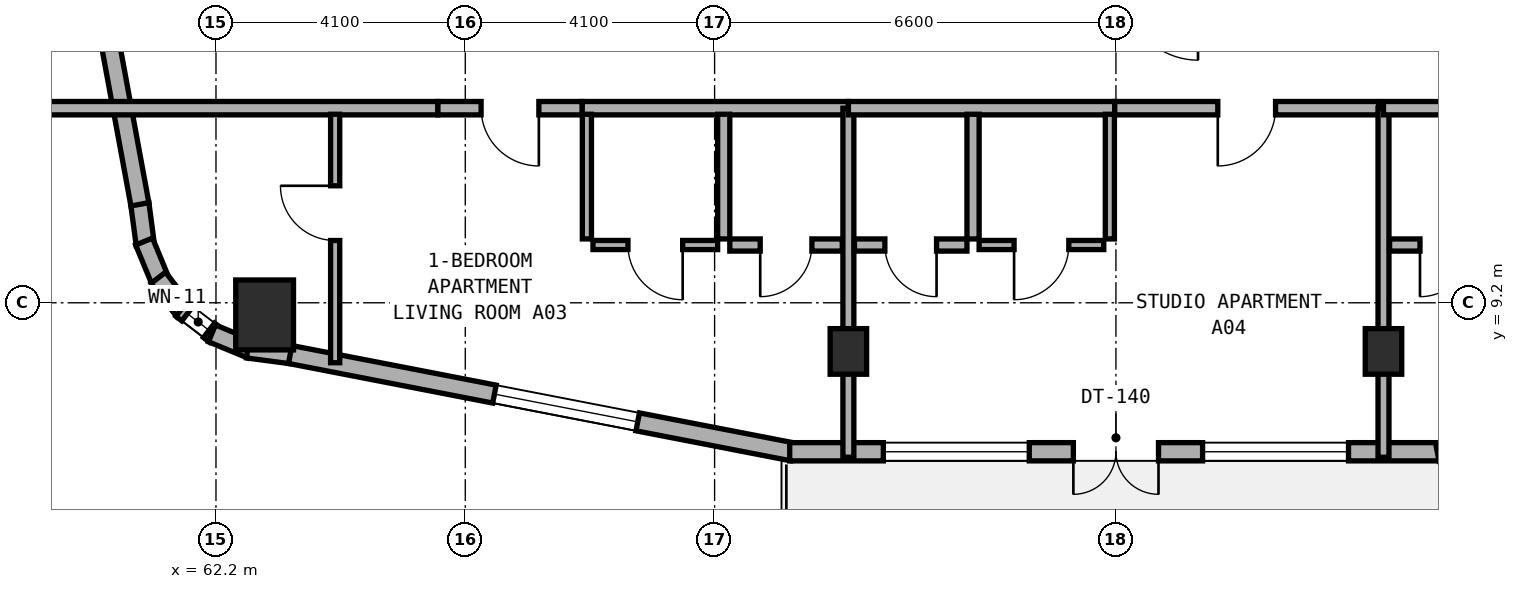
"""IFC4 building model, lengths in metres.
Left out: names, types, materials, properties, quantities, classifications, styles, units other than length and angle.
Written with IfcOpenShell. Run it as: python <this file> out.ifc"""

import sys

from ifc_helpers import new_model, si_unit, direction, frame, frame_2d, origin, origin_2d, place, context, subcontext, project, spatial, rectangle, extrude, element, fill, save


model = new_model("IFC4")
c1 = context("Model", 3, precision=1e-05, world=origin(), true_north=direction((0.0, 1.0)))
c2 = subcontext(c1, "Body", "Model", "MODEL_VIEW")
j1 = project(units=[si_unit("LENGTHUNIT", "METRE"), si_unit("PLANEANGLEUNIT", "RADIAN")], contexts=[c1])
p1 = place(None, origin())
s1 = spatial("IfcSite", under=j1, at=p1, CompositionType="ELEMENT")
p2 = place(p1, origin())
s2 = spatial("IfcBuilding", under=s1, at=p2, CompositionType="ELEMENT")
p3 = place(p2, frame((0.0, 0.0, 80.0)))
s3 = spatial("IfcBuildingStorey", under=s2, at=p3, CompositionType="ELEMENT", Elevation=80.0)
for number, where, z_axis, x_axis in (
    (1, (72.6, 8.4, 0.0), (0.0, 0.0, 1.0), (1.0, 0.0, 0.0)),
    (2, (81.4, 8.4, 0.0), (0.0, 0.0, 1.0), (1.0, 0.0, 0.0)),
):
    element("IfcColumn", number, at=place(p3, frame(where, z_axis=z_axis, x_axis=x_axis)), inside=s3, PredefinedType="COLUMN", context=c2, shape_type="SweptSolid", body=[
        extrude(rectangle(XDim=0.6, YDim=0.75, at=origin_2d()), origin(), (0.0, 0.0, 1.0), 3.5),
    ])
p4 = place(p3, frame((63.0, 9.0, 0.0), z_axis=(0.0, 0.0, 1.0), x_axis=(1.0, 0.0, 0.0)))
e3 = element("IfcColumn", 3, at=p4, inside=s3, PredefinedType="COLUMN", context=c2, shape_type="SweptSolid", body=[
    extrude(rectangle(XDim=0.95, YDim=1.15, at=origin_2d()), origin(), (0.0, 0.0, 1.0), 3.5),
])
p5 = place(p3, frame((60.948, 10.828, 0.0), z_axis=(0.0, 0.0, 1.0), x_axis=(0.131667498923, -0.991293937098, 0.0)))
e4 = element("IfcWall", 4, at=p5, inside=s3, PredefinedType="STANDARD", context=c2, shape_type="SweptSolid", body=[
    extrude(rectangle(XDim=0.677, YDim=0.3, at=frame_2d((0.338, 0.0))), origin(), (0.0, 0.0, 1.0), 3.25),
])
p6 = place(p3, frame((61.018, 10.207, 0.0), z_axis=(0.0, 0.0, 1.0), x_axis=(0.381864727877, -0.92421822618, 0.0)))
e5 = element("IfcWall", 5, at=p6, inside=s3, PredefinedType="STANDARD", context=c2, shape_type="SweptSolid", body=[
    extrude(rectangle(XDim=0.694, YDim=0.3, at=frame_2d((0.347, 0.0))), origin(), (0.0, 0.0, 1.0), 3.25),
])
p7 = place(p3, frame((61.252, 9.611, 0.0), z_axis=(0.0, 0.0, 1.0), x_axis=(0.609693758543, -0.792637067512, 0.0)))
e6 = element("IfcWall", 6, at=p7, inside=s3, PredefinedType="STANDARD", context=c2, shape_type="SweptSolid", body=[
    extrude(rectangle(XDim=0.694, YDim=0.3, at=frame_2d((0.347, 0.0))), origin(), (0.0, 0.0, 1.0), 3.25),
])
p8 = place(p3, frame((61.633, 9.096, 0.0), z_axis=(0.0, 0.0, 1.0), x_axis=(0.792807092876, -0.609472651958, 0.0)))
e7 = element("IfcWall", 7, at=p8, inside=s3, PredefinedType="STANDARD", context=c2, shape_type="SweptSolid", body=[
    extrude(rectangle(XDim=0.694, YDim=0.3, at=frame_2d((0.347, 0.0))), origin(), (0.0, 0.0, 1.0), 3.25),
])
p9 = place(p8, frame((0.122, 0.0, 0.85)))
e8 = element("IfcOpeningElement", 8, at=p9, cuts=e7, PredefinedType="OPENING", context=c2, shape_type="SweptSolid", body=[
    extrude(rectangle(XDim=0.45, YDim=1.5, at=frame_2d((0.225, 0.75))), frame((0.0, 0.16, 0.0), z_axis=(0.0, -1.0, 0.0), x_axis=(1.0, 0.0, 0.0)), (0.0, 0.0, 1.0), 0.32),
])
p10 = place(p3, frame((62.134, 8.697, 0.0), z_axis=(0.0, 0.0, 1.0), x_axis=(0.924042561464, -0.382289608286, 0.0)))
e9 = element("IfcWall", 9, at=p10, inside=s3, PredefinedType="STANDARD", context=c2, shape_type="SweptSolid", body=[
    extrude(rectangle(XDim=0.694, YDim=0.3, at=frame_2d((0.347, 0.0))), origin(), (0.0, 0.0, 1.0), 3.25),
])
p11 = place(p3, frame((62.722, 8.441, 0.0), z_axis=(0.0, 0.0, 1.0), x_axis=(0.991433279471, -0.130614135366, 0.0)))
e10 = element("IfcWall", 10, at=p11, inside=s3, PredefinedType="STANDARD", context=c2, shape_type="SweptSolid", body=[
    extrude(rectangle(XDim=0.712, YDim=0.3, at=frame_2d((0.356, 0.0))), origin(), (0.0, 0.0, 1.0), 3.25),
])
p12 = place(p3, frame((63.421, 8.349, 0.0), z_axis=(0.0, 0.0, 1.0), x_axis=(0.98174070399, -0.190224052445, 0.0)))
e11 = element("IfcWall", 11, at=p12, inside=s3, PredefinedType="STANDARD", context=c2, shape_type="SweptSolid", body=[
    extrude(rectangle(XDim=8.412, YDim=0.3, at=frame_2d((4.206, 0.0))), origin(), (0.0, 0.0, 1.0), 3.25),
])
p13 = place(p12, frame((3.421, 0.0, 0.8)))
e12 = element("IfcOpeningElement", 12, at=p13, cuts=e11, PredefinedType="OPENING", context=c2, shape_type="SweptSolid", body=[
    extrude(rectangle(XDim=2.4, YDim=1.6, at=frame_2d((1.2, 0.8))), frame((0.0, 0.16, 0.0), z_axis=(0.0, -1.0, 0.0), x_axis=(1.0, 0.0, 0.0)), (0.0, 0.0, 1.0), 0.32),
])
p14 = place(p3, frame((71.635, 6.75, 0.0), z_axis=(0.0, 0.0, 1.0), x_axis=(1.0, 0.0, 0.0)))
e13 = element("IfcWall", 13, at=p14, inside=s3, PredefinedType="STANDARD", context=c2, shape_type="SweptSolid", body=[
    extrude(rectangle(XDim=10.695, YDim=0.3, at=frame_2d((5.348, 0.0))), origin(), (0.0, 0.0, 1.0), 3.25),
])
p15 = place(p14, frame((4.665, 0.0, 0.0)))
e14 = element("IfcOpeningElement", 14, at=p15, cuts=e13, PredefinedType="OPENING", context=c2, shape_type="SweptSolid", body=[
    extrude(rectangle(XDim=1.4, YDim=2.15, at=frame_2d((0.7, 1.075))), frame((0.0, 0.16, 0.0), z_axis=(0.0, -1.0, 0.0), x_axis=(1.0, 0.0, 0.0)), (0.0, 0.0, 1.0), 0.32),
])
p16 = place(p14, frame((1.54, 0.0, 0.8)))
e15 = element("IfcOpeningElement", 15, at=p16, cuts=e13, PredefinedType="OPENING", context=c2, shape_type="SweptSolid", body=[
    extrude(rectangle(XDim=2.4, YDim=1.6, at=frame_2d((1.2, 0.8))), frame((0.0, 0.16, 0.0), z_axis=(0.0, -1.0, 0.0), x_axis=(1.0, 0.0, 0.0)), (0.0, 0.0, 1.0), 0.32),
])
p17 = place(p14, frame((6.79, 0.0, 0.8)))
e16 = element("IfcOpeningElement", 16, at=p17, cuts=e13, PredefinedType="OPENING", context=c2, shape_type="SweptSolid", body=[
    extrude(rectangle(XDim=2.4, YDim=1.6, at=frame_2d((1.2, 0.8))), frame((0.0, 0.16, 0.0), z_axis=(0.0, -1.0, 0.0), x_axis=(1.0, 0.0, 0.0)), (0.0, 0.0, 1.0), 0.32),
])
p18 = place(p3, frame((82.286, 6.742, 0.0), z_axis=(0.0, 0.0, 1.0), x_axis=(0.981734775858, 0.190254644808, 0.0)))
e17 = element("IfcWall", 17, at=p18, inside=s3, PredefinedType="STANDARD", context=c2, shape_type="SweptSolid", body=[
    extrude(rectangle(XDim=8.448, YDim=0.3, at=frame_2d((4.224, 0.0))), origin(), (0.0, 0.0, 1.0), 3.25),
])
p19 = place(p18, frame((2.609, 0.0, 0.8)))
e18 = element("IfcOpeningElement", 18, at=p19, cuts=e17, PredefinedType="OPENING", context=c2, shape_type="SweptSolid", body=[
    extrude(rectangle(XDim=2.4, YDim=1.6, at=frame_2d((1.2, 0.8))), frame((0.0, 0.16, 0.0), z_axis=(0.0, -1.0, 0.0), x_axis=(1.0, 0.0, 0.0)), (0.0, 0.0, 1.0), 0.32),
])
p20 = place(p3, frame((59.338, 19.561, 0.0), z_axis=(0.0, 0.0, 1.0), x_axis=(0.181241420611, -0.983438634311, 0.0)))
e19 = element("IfcWall", 19, at=p20, inside=s3, PredefinedType="STANDARD", context=c2, shape_type="SweptSolid", body=[
    extrude(rectangle(XDim=8.889, YDim=0.3, at=frame_2d((4.445, 0.0))), origin(), (0.0, 0.0, 1.0), 3.25),
])
p21 = place(p20, frame((1.497, 0.0, 0.8)))
e20 = element("IfcOpeningElement", 20, at=p21, cuts=e19, PredefinedType="OPENING", context=c2, shape_type="SweptSolid", body=[
    extrude(rectangle(XDim=2.4, YDim=1.6, at=frame_2d((1.2, 0.8))), frame((0.0, 0.16, 0.0), z_axis=(0.0, -1.0, 0.0), x_axis=(1.0, 0.0, 0.0)), (0.0, 0.0, 1.0), 0.32),
])
p22 = place(p3, frame((59.36, 12.4, 0.0), z_axis=(0.0, 0.0, 1.0), x_axis=(1.0, 0.0, 0.0)))
e21 = element("IfcWall", 21, at=p22, inside=s3, PredefinedType="SOLIDWALL", context=c2, shape_type="SweptSolid", body=[
    extrude(rectangle(XDim=6.49, YDim=0.22, at=frame_2d((3.245, 0.0))), origin(), (0.0, 0.0, 1.0), 2.945),
])
p23 = place(p3, frame((68.22, 12.4, 0.0), z_axis=(0.0, 0.0, 1.0), x_axis=(1.0, 0.0, 0.0)))
e22 = element("IfcWall", 22, at=p23, inside=s3, PredefinedType="SOLIDWALL", context=c2, shape_type="SweptSolid", body=[
    extrude(rectangle(XDim=4.38, YDim=0.22, at=frame_2d((2.19, 0.0))), origin(), (0.0, 0.0, 1.0), 2.825),
])
p24 = place(p3, frame((65.85, 12.4, 0.0), z_axis=(0.0, 0.0, 1.0), x_axis=(1.0, 0.0, 0.0)))
e23 = element("IfcWall", 23, at=p24, inside=s3, PredefinedType="SOLIDWALL", context=c2, shape_type="SweptSolid", body=[
    extrude(rectangle(XDim=2.37, YDim=0.22, at=frame_2d((1.185, 0.0))), origin(), (0.0, 0.0, 1.0), 3.22),
])
p25 = place(p24, frame((0.71, 0.0, 0.0)))
e24 = element("IfcOpeningElement", 24, at=p25, cuts=e23, PredefinedType="OPENING", context=c2, shape_type="SweptSolid", body=[
    extrude(rectangle(XDim=0.95, YDim=2.1, at=frame_2d((0.475, 1.05))), frame((0.0, 0.12, 0.0), z_axis=(0.0, -1.0, 0.0), x_axis=(1.0, 0.0, 0.0)), (0.0, 0.0, 1.0), 0.24),
])
p26 = place(p3, frame((64.16, 8.214, 0.0), z_axis=(0.0, 0.0, 1.0), x_axis=(0.0, 1.0, 0.0)))
e25 = element("IfcWall", 25, at=p26, inside=s3, PredefinedType="PARTITIONING", context=c2, shape_type="SweptSolid", body=[
    extrude(rectangle(XDim=4.086, YDim=0.15, at=frame_2d((2.043, 0.0))), origin(), (0.0, 0.0, 1.0), 2.945),
])
p27 = place(p26, frame((2.01, 0.0, 0.0)))
e26 = element("IfcOpeningElement", 26, at=p27, cuts=e25, PredefinedType="OPENING", context=c2, shape_type="SweptSolid", body=[
    extrude(rectangle(XDim=0.9, YDim=2.1, at=frame_2d((0.45, 1.05))), frame((0.0, 0.085, 0.0), z_axis=(0.0, -1.0, 0.0), x_axis=(1.0, 0.0, 0.0)), (0.0, 0.0, 1.0), 0.17),
])
p28 = place(p3, frame((70.55, 10.25, 0.0), z_axis=(0.0, 0.0, 1.0), x_axis=(0.0, 1.0, 0.0)))
e27 = element("IfcWall", 27, at=p28, inside=s3, PredefinedType="PLUMBINGWALL", context=c2, shape_type="SweptSolid", body=[
    extrude(rectangle(XDim=2.05, YDim=0.2, at=frame_2d((1.025, 0.0))), origin(), (0.0, 0.0, 1.0), 3.22),
])
p29 = place(p3, frame((68.3, 10.25, 0.0), z_axis=(0.0, 0.0, 1.0), x_axis=(0.0, 1.0, 0.0)))
e28 = element("IfcWall", 28, at=p29, inside=s3, PredefinedType="PARTITIONING", context=c2, shape_type="SweptSolid", body=[
    extrude(rectangle(XDim=2.05, YDim=0.15, at=frame_2d((1.025, 0.0))), origin(), (0.0, 0.0, 1.0), 3.22),
])
p30 = place(p3, frame((70.65, 10.15, 0.0), z_axis=(0.0, 0.0, 1.0), x_axis=(1.0, 0.0, 0.0)))
e29 = element("IfcWall", 29, at=p30, inside=s3, PredefinedType="PLUMBINGWALL", context=c2, shape_type="SweptSolid", body=[
    extrude(rectangle(XDim=1.85, YDim=0.2, at=frame_2d((0.925, 0.0))), origin(), (0.0, 0.0, 1.0), 3.22),
])
p31 = place(p30, frame((0.5, 0.0, 0.0)))
e30 = element("IfcOpeningElement", 30, at=p31, cuts=e29, PredefinedType="OPENING", context=c2, shape_type="SweptSolid", body=[
    extrude(rectangle(XDim=0.85, YDim=2.1, at=frame_2d((0.425, 1.05))), frame((0.0, 0.11, 0.0), z_axis=(0.0, -1.0, 0.0), x_axis=(1.0, 0.0, 0.0)), (0.0, 0.0, 1.0), 0.22),
])
p32 = place(p3, frame((68.4, 10.15, 0.0), z_axis=(0.0, 0.0, 1.0), x_axis=(1.0, 0.0, 0.0)))
e31 = element("IfcWall", 31, at=p32, inside=s3, PredefinedType="PARTITIONING", context=c2, shape_type="SweptSolid", body=[
    extrude(rectangle(XDim=2.05, YDim=0.15, at=frame_2d((1.025, 0.0))), origin(), (0.0, 0.0, 1.0), 3.22),
])
p33 = place(p32, frame((0.575, 0.0, 0.0)))
e32 = element("IfcOpeningElement", 32, at=p33, cuts=e31, PredefinedType="OPENING", context=c2, shape_type="SweptSolid", body=[
    extrude(rectangle(XDim=0.9, YDim=2.1, at=frame_2d((0.45, 1.05))), frame((0.0, 0.085, 0.0), z_axis=(0.0, -1.0, 0.0), x_axis=(1.0, 0.0, 0.0)), (0.0, 0.0, 1.0), 0.17),
])
p34 = place(p3, frame((72.6, 6.66, 0.0), z_axis=(0.0, 0.0, 1.0), x_axis=(0.0, 1.0, 0.0)))
e33 = element("IfcWall", 33, at=p34, inside=s3, PredefinedType="SOLIDWALL", context=c2, shape_type="SweptSolid", body=[
    extrude(rectangle(XDim=5.74, YDim=0.18, at=frame_2d((2.87, 0.0))), origin(), (0.0, 0.0, 1.0), 2.825),
])
p35 = place(p3, frame((72.6, 12.4, 0.0), z_axis=(0.0, 0.0, 1.0), x_axis=(1.0, 0.0, 0.0)))
e34 = element("IfcWall", 34, at=p35, inside=s3, PredefinedType="SOLIDWALL", context=c2, shape_type="SweptSolid", body=[
    extrude(rectangle(XDim=4.38, YDim=0.22, at=frame_2d((2.19, 0.0))), origin(), (0.0, 0.0, 1.0), 2.825),
])
p36 = place(p3, frame((76.98, 12.4, 0.0), z_axis=(0.0, 0.0, 1.0), x_axis=(1.0, 0.0, 0.0)))
e35 = element("IfcWall", 35, at=p36, inside=s3, PredefinedType="SOLIDWALL", context=c2, shape_type="SweptSolid", body=[
    extrude(rectangle(XDim=4.34, YDim=0.22, at=frame_2d((2.17, 0.0))), origin(), (0.0, 0.0, 1.0), 2.825),
])
p37 = place(p36, frame((1.695, 0.0, 0.0)))
e36 = element("IfcOpeningElement", 36, at=p37, cuts=e35, PredefinedType="OPENING", context=c2, shape_type="SweptSolid", body=[
    extrude(rectangle(XDim=0.95, YDim=2.1, at=frame_2d((0.475, 1.05))), frame((0.0, 0.12, 0.0), z_axis=(0.0, -1.0, 0.0), x_axis=(1.0, 0.0, 0.0)), (0.0, 0.0, 1.0), 0.24),
])
p38 = place(p3, frame((74.65, 10.25, 0.0), z_axis=(0.0, 0.0, 1.0), x_axis=(0.0, 1.0, 0.0)))
e37 = element("IfcWall", 37, at=p38, inside=s3, PredefinedType="PLUMBINGWALL", context=c2, shape_type="SweptSolid", body=[
    extrude(rectangle(XDim=2.05, YDim=0.2, at=frame_2d((1.025, 0.0))), origin(), (0.0, 0.0, 1.0), 2.825),
])
p39 = place(p3, frame((76.9, 10.25, 0.0), z_axis=(0.0, 0.0, 1.0), x_axis=(0.0, 1.0, 0.0)))
e38 = element("IfcWall", 38, at=p39, inside=s3, PredefinedType="PARTITIONING", context=c2, shape_type="SweptSolid", body=[
    extrude(rectangle(XDim=2.05, YDim=0.15, at=frame_2d((1.025, 0.0))), origin(), (0.0, 0.0, 1.0), 2.825),
])
p40 = place(p3, frame((72.7, 10.15, 0.0), z_axis=(0.0, 0.0, 1.0), x_axis=(1.0, 0.0, 0.0)))
e39 = element("IfcWall", 39, at=p40, inside=s3, PredefinedType="PLUMBINGWALL", context=c2, shape_type="SweptSolid", body=[
    extrude(rectangle(XDim=1.85, YDim=0.2, at=frame_2d((0.925, 0.0))), origin(), (0.0, 0.0, 1.0), 3.22),
])
p41 = place(p40, frame((0.5, 0.0, 0.0)))
e40 = element("IfcOpeningElement", 40, at=p41, cuts=e39, PredefinedType="OPENING", context=c2, shape_type="SweptSolid", body=[
    extrude(rectangle(XDim=0.85, YDim=2.1, at=frame_2d((0.425, 1.05))), frame((0.0, 0.11, 0.0), z_axis=(0.0, -1.0, 0.0), x_axis=(1.0, 0.0, 0.0)), (0.0, 0.0, 1.0), 0.22),
])
p42 = place(p3, frame((74.75, 10.15, 0.0), z_axis=(0.0, 0.0, 1.0), x_axis=(1.0, 0.0, 0.0)))
e41 = element("IfcWall", 41, at=p42, inside=s3, PredefinedType="PARTITIONING", context=c2, shape_type="SweptSolid", body=[
    extrude(rectangle(XDim=2.05, YDim=0.15, at=frame_2d((1.025, 0.0))), origin(), (0.0, 0.0, 1.0), 3.22),
])
p43 = place(p42, frame((0.575, 0.0, 0.0)))
e42 = element("IfcOpeningElement", 42, at=p43, cuts=e41, PredefinedType="OPENING", context=c2, shape_type="SweptSolid", body=[
    extrude(rectangle(XDim=0.9, YDim=2.1, at=frame_2d((0.45, 1.05))), frame((0.0, 0.085, 0.0), z_axis=(0.0, -1.0, 0.0), x_axis=(1.0, 0.0, 0.0)), (0.0, 0.0, 1.0), 0.17),
])
p44 = place(p3, frame((81.4, 6.66, 0.0), z_axis=(0.0, 0.0, 1.0), x_axis=(0.0, 1.0, 0.0)))
e43 = element("IfcWall", 43, at=p44, inside=s3, PredefinedType="SOLIDWALL", context=c2, shape_type="SweptSolid", body=[
    extrude(rectangle(XDim=5.74, YDim=0.18, at=frame_2d((2.87, 0.0))), origin(), (0.0, 0.0, 1.0), 2.825),
])
p45 = place(p3, frame((81.4, 12.4, 0.0), z_axis=(0.0, 0.0, 1.0), x_axis=(1.0, 0.0, 0.0)))
e44 = element("IfcWall", 44, at=p45, inside=s3, PredefinedType="SOLIDWALL", context=c2, shape_type="SweptSolid", body=[
    extrude(rectangle(XDim=4.38, YDim=0.22, at=frame_2d((2.19, 0.0))), origin(), (0.0, 0.0, 1.0), 2.825),
])
p46 = place(p3, frame((81.5, 10.15, 0.0), z_axis=(0.0, 0.0, 1.0), x_axis=(1.0, 0.0, 0.0)))
e45 = element("IfcWall", 45, at=p46, inside=s3, PredefinedType="PLUMBINGWALL", context=c2, shape_type="SweptSolid", body=[
    extrude(rectangle(XDim=1.85, YDim=0.2, at=frame_2d((0.925, 0.0))), origin(), (0.0, 0.0, 1.0), 2.825),
])
p47 = place(p46, frame((0.5, 0.0, 0.0)))
e46 = element("IfcOpeningElement", 46, at=p47, cuts=e45, PredefinedType="OPENING", context=c2, shape_type="SweptSolid", body=[
    extrude(rectangle(XDim=0.85, YDim=2.1, at=frame_2d((0.425, 1.05))), frame((0.0, 0.11, 0.0), z_axis=(0.0, -1.0, 0.0), x_axis=(1.0, 0.0, 0.0)), (0.0, 0.0, 1.0), 0.22),
])
p48 = place(p13, origin())
e47 = element("IfcWindow", 47, at=p48, inside=s3, PartitioningType="SINGLE_PANEL", PredefinedType="WINDOW", context=c2, shape_type="SweptSolid", body=[
    extrude(rectangle(XDim=2.4, YDim=1.6, at=frame_2d((1.2, 0.8))), frame((0.0, 0.03, 0.0), z_axis=(0.0, -1.0, 0.0), x_axis=(1.0, 0.0, 0.0)), (0.0, 0.0, 1.0), 0.06),
])
fill(e12, e47)
p49 = place(p15, frame((1.4, 0.0, 0.0), z_axis=(0.0, 0.0, 1.0), x_axis=(-1.0, 0.0, 0.0)))
e48 = element("IfcDoor", 48, at=p49, inside=s3, OperationType="DOUBLE_DOOR_SINGLE_SWING", PredefinedType="DOOR", context=c2, shape_type="SweptSolid", body=[
    extrude(rectangle(XDim=1.4, YDim=2.15, at=frame_2d((0.7, 1.075))), frame((0.0, 0.025, 0.0), z_axis=(0.0, -1.0, 0.0), x_axis=(1.0, 0.0, 0.0)), (0.0, 0.0, 1.0), 0.05),
])
fill(e14, e48)
p50 = place(p16, origin())
e49 = element("IfcWindow", 49, at=p50, inside=s3, PartitioningType="SINGLE_PANEL", PredefinedType="WINDOW", context=c2, shape_type="SweptSolid", body=[
    extrude(rectangle(XDim=2.4, YDim=1.6, at=frame_2d((1.2, 0.8))), frame((0.0, 0.03, 0.0), z_axis=(0.0, -1.0, 0.0), x_axis=(1.0, 0.0, 0.0)), (0.0, 0.0, 1.0), 0.06),
])
fill(e15, e49)
p51 = place(p17, origin())
e50 = element("IfcWindow", 50, at=p51, inside=s3, PartitioningType="SINGLE_PANEL", PredefinedType="WINDOW", context=c2, shape_type="SweptSolid", body=[
    extrude(rectangle(XDim=2.4, YDim=1.6, at=frame_2d((1.2, 0.8))), frame((0.0, 0.03, 0.0), z_axis=(0.0, -1.0, 0.0), x_axis=(1.0, 0.0, 0.0)), (0.0, 0.0, 1.0), 0.06),
])
fill(e16, e50)
p52 = place(p9, origin())
e51 = element("IfcWindow", 51, at=p52, inside=s3, PartitioningType="SINGLE_PANEL", PredefinedType="WINDOW", context=c2, shape_type="SweptSolid", body=[
    extrude(rectangle(XDim=0.45, YDim=1.5, at=frame_2d((0.225, 0.75))), frame((0.0, 0.03, 0.0), z_axis=(0.0, -1.0, 0.0), x_axis=(1.0, 0.0, 0.0)), (0.0, 0.0, 1.0), 0.06),
])
fill(e8, e51)
p53 = place(p25, frame((0.95, 0.0, 0.0), z_axis=(0.0, 0.0, 1.0), x_axis=(-1.0, 0.0, 0.0)))
e52 = element("IfcDoor", 52, at=p53, inside=s3, OperationType="SINGLE_SWING_LEFT", PredefinedType="DOOR", context=c2, shape_type="SweptSolid", body=[
    extrude(rectangle(XDim=0.95, YDim=2.1, at=frame_2d((0.475, 1.05))), frame((0.0, 0.025, 0.0), z_axis=(0.0, -1.0, 0.0), x_axis=(1.0, 0.0, 0.0)), (0.0, 0.0, 1.0), 0.05),
])
fill(e24, e52)
p54 = place(p27, origin())
e53 = element("IfcDoor", 53, at=p54, inside=s3, OperationType="SINGLE_SWING_RIGHT", PredefinedType="DOOR", context=c2, shape_type="SweptSolid", body=[
    extrude(rectangle(XDim=0.9, YDim=2.1, at=frame_2d((0.45, 1.05))), frame((0.0, 0.025, 0.0), z_axis=(0.0, -1.0, 0.0), x_axis=(1.0, 0.0, 0.0)), (0.0, 0.0, 1.0), 0.05),
])
fill(e26, e53)
p55 = place(p31, frame((0.85, 0.0, 0.0), z_axis=(0.0, 0.0, 1.0), x_axis=(-1.0, 0.0, 0.0)))
e54 = element("IfcDoor", 54, at=p55, inside=s3, OperationType="SINGLE_SWING_RIGHT", PredefinedType="DOOR", context=c2, shape_type="SweptSolid", body=[
    extrude(rectangle(XDim=0.85, YDim=2.1, at=frame_2d((0.425, 1.05))), frame((0.0, 0.025, 0.0), z_axis=(0.0, -1.0, 0.0), x_axis=(1.0, 0.0, 0.0)), (0.0, 0.0, 1.0), 0.05),
])
fill(e30, e54)
p56 = place(p33, frame((0.9, 0.0, 0.0), z_axis=(0.0, 0.0, 1.0), x_axis=(-1.0, 0.0, 0.0)))
e55 = element("IfcDoor", 55, at=p56, inside=s3, OperationType="SINGLE_SWING_LEFT", PredefinedType="DOOR", context=c2, shape_type="SweptSolid", body=[
    extrude(rectangle(XDim=0.9, YDim=2.1, at=frame_2d((0.45, 1.05))), frame((0.0, 0.025, 0.0), z_axis=(0.0, -1.0, 0.0), x_axis=(1.0, 0.0, 0.0)), (0.0, 0.0, 1.0), 0.05),
])
fill(e32, e55)
p57 = place(p37, frame((0.95, 0.0, 0.0), z_axis=(0.0, 0.0, 1.0), x_axis=(-1.0, 0.0, 0.0)))
e56 = element("IfcDoor", 56, at=p57, inside=s3, OperationType="SINGLE_SWING_RIGHT", PredefinedType="DOOR", context=c2, shape_type="SweptSolid", body=[
    extrude(rectangle(XDim=0.95, YDim=2.1, at=frame_2d((0.475, 1.05))), frame((0.0, 0.025, 0.0), z_axis=(0.0, -1.0, 0.0), x_axis=(1.0, 0.0, 0.0)), (0.0, 0.0, 1.0), 0.05),
])
fill(e36, e56)
p58 = place(p41, frame((0.85, 0.0, 0.0), z_axis=(0.0, 0.0, 1.0), x_axis=(-1.0, 0.0, 0.0)))
e57 = element("IfcDoor", 57, at=p58, inside=s3, OperationType="SINGLE_SWING_LEFT", PredefinedType="DOOR", context=c2, shape_type="SweptSolid", body=[
    extrude(rectangle(XDim=0.85, YDim=2.1, at=frame_2d((0.425, 1.05))), frame((0.0, 0.025, 0.0), z_axis=(0.0, -1.0, 0.0), x_axis=(1.0, 0.0, 0.0)), (0.0, 0.0, 1.0), 0.05),
])
fill(e40, e57)
p59 = place(p43, frame((0.9, 0.0, 0.0), z_axis=(0.0, 0.0, 1.0), x_axis=(-1.0, 0.0, 0.0)))
e58 = element("IfcDoor", 58, at=p59, inside=s3, OperationType="SINGLE_SWING_RIGHT", PredefinedType="DOOR", context=c2, shape_type="SweptSolid", body=[
    extrude(rectangle(XDim=0.9, YDim=2.1, at=frame_2d((0.45, 1.05))), frame((0.0, 0.025, 0.0), z_axis=(0.0, -1.0, 0.0), x_axis=(1.0, 0.0, 0.0)), (0.0, 0.0, 1.0), 0.05),
])
fill(e42, e58)
p60 = place(p47, frame((0.85, 0.0, 0.0), z_axis=(0.0, 0.0, 1.0), x_axis=(-1.0, 0.0, 0.0)))
e59 = element("IfcDoor", 59, at=p60, inside=s3, OperationType="SINGLE_SWING_RIGHT", PredefinedType="DOOR", context=c2, shape_type="SweptSolid", body=[
    extrude(rectangle(XDim=0.85, YDim=2.1, at=frame_2d((0.425, 1.05))), frame((0.0, 0.025, 0.0), z_axis=(0.0, -1.0, 0.0), x_axis=(1.0, 0.0, 0.0)), (0.0, 0.0, 1.0), 0.05),
])
fill(e46, e59)
save(model, sys.argv[1])
